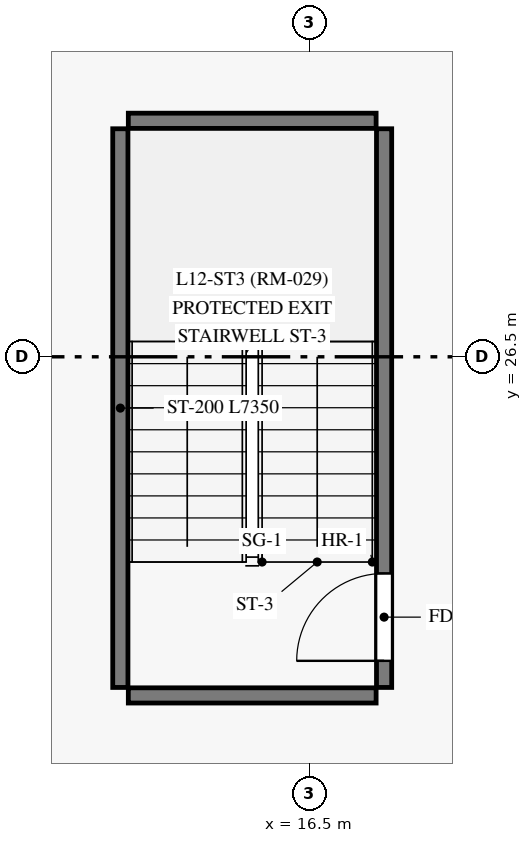
"""IFC4 building model, lengths in metres.
Left out: names, types, materials, properties, quantities, classifications, styles, units other than length and angle.
Written with IfcOpenShell. Run it as: python <this file> out.ifc"""

import sys

from ifc_helpers import new_model, si_unit, direction, frame, frame_2d, origin, origin_with_axes, place, context, subcontext, project, spatial, rectangle, extrude, source, transform, mapped, element, fill, save


model = new_model("IFC4")
c1 = context("Model", 3, precision=1e-05, world=origin(), true_north=direction((0.0, 1.0)))
c2 = subcontext(c1, "Body", "Model", "MODEL_VIEW")
j1 = project(units=[si_unit("LENGTHUNIT", "METRE"), si_unit("PLANEANGLEUNIT", "RADIAN")], contexts=[c1])
p1 = place(None, origin())
s1 = spatial("IfcSite", under=j1, at=p1, CompositionType="ELEMENT")
p2 = place(p1, origin())
s2 = spatial("IfcBuilding", under=s1, at=p2, CompositionType="ELEMENT")
p3 = place(p2, frame((0.0, 0.0, 48.1)))
s3 = spatial("IfcBuildingStorey", under=s2, at=p3, CompositionType="ELEMENT", Elevation=48.1)
p4 = place(p3, frame((14.015, 22.15, 0.0), z_axis=(0.0, 0.0, 1.0), x_axis=(0.0, 1.0, 0.0)))
e1 = element("IfcWall", 1, at=p4, inside=s3, PredefinedType="SHEAR", context=c2, shape_type="SweptSolid", body=[
    extrude(rectangle(XDim=7.35, YDim=0.2, at=frame_2d((3.675, 0.0))), origin(), (0.0, 0.0, 1.0), 3.35),
])
p5 = place(p3, frame((17.485, 22.15, 0.0), z_axis=(0.0, 0.0, 1.0), x_axis=(0.0, 1.0, 0.0)))
e2 = element("IfcWall", 2, at=p5, inside=s3, PredefinedType="SHEAR", context=c2, shape_type="SweptSolid", body=[
    extrude(rectangle(XDim=7.35, YDim=0.2, at=frame_2d((3.675, 0.0))), origin(), (0.0, 0.0, 1.0), 3.35),
])
p6 = place(p5, frame((0.35, 0.0, 0.0)))
e3 = element("IfcOpeningElement", 3, at=p6, cuts=e2, PredefinedType="OPENING", context=c2, shape_type="SweptSolid", body=[
    extrude(rectangle(XDim=1.15, YDim=2.15, at=frame_2d((0.575, 1.075))), frame((0.0, 0.11, 0.0), z_axis=(0.0, -1.0, 0.0), x_axis=(1.0, 0.0, 0.0)), (0.0, 0.0, 1.0), 0.22),
])
for number, where, z_axis, x_axis in (
    (4, (14.12, 22.045, 0.0), (0.0, 0.0, 1.0), (1.0, 0.0, 0.0)),
    (5, (14.12, 29.605, 0.0), (0.0, 0.0, 1.0), (1.0, 0.0, 0.0)),
):
    element("IfcWall", number, at=place(p3, frame(where, z_axis=z_axis, x_axis=x_axis)), inside=s3, PredefinedType="SHEAR", context=c2, shape_type="SweptSolid", body=[
        extrude(rectangle(XDim=3.26, YDim=0.2, at=frame_2d((1.63, 0.0))), origin(), (0.0, 0.0, 1.0), 3.35),
    ])
m1 = source(origin_with_axes(), c2, "Body", "SweptSolid", [
    extrude(rectangle(XDim=1.15, YDim=2.15, at=frame_2d((0.575, 1.075))), frame((0.0, 0.025, 0.0), z_axis=(0.0, -1.0, 0.0), x_axis=(1.0, 0.0, 0.0)), (0.0, 0.0, 1.0), 0.05),
])
p7 = place(p6, origin())
e6 = element("IfcDoor", 6, at=p7, inside=s3, OperationType="SINGLE_SWING_LEFT", PredefinedType="DOOR", context=c2, shape_type="MappedRepresentation", body=[
    mapped(m1, transform((0.0, 0.0, 0.0), scale=1.0)),
])
fill(e3, e6)
save(model, sys.argv[1])
